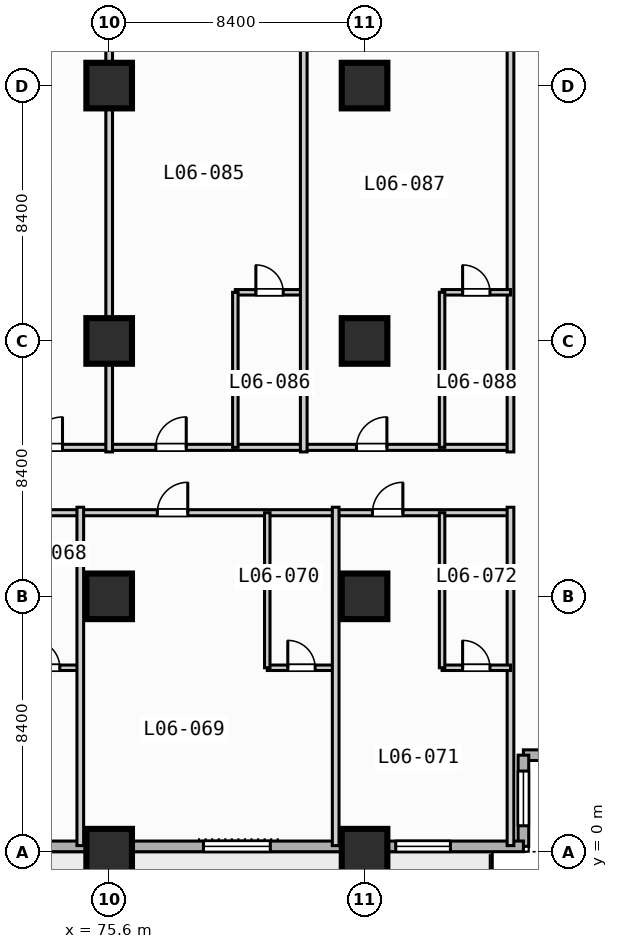
"""IFC4 building model, lengths in metres.
Left out: names, types, materials, properties, quantities, classifications, styles, units other than length and angle.
Written with IfcOpenShell. Run it as: python <this file> out.ifc"""

import sys

from ifc_helpers import new_model, si_unit, direction, frame, frame_2d, origin, origin_2d, place, context, subcontext, project, spatial, rectangle, extrude, element, fill, save


model = new_model("IFC4")
c1 = context("Model", 3, precision=1e-05, world=origin(), true_north=direction((0.0, 1.0)))
c2 = subcontext(c1, "Body", "Model", "MODEL_VIEW")
j1 = project(units=[si_unit("LENGTHUNIT", "METRE"), si_unit("PLANEANGLEUNIT", "RADIAN")], contexts=[c1])
p1 = place(None, origin())
s1 = spatial("IfcSite", under=j1, at=p1, CompositionType="ELEMENT")
p2 = place(p1, origin())
s2 = spatial("IfcBuilding", under=s1, at=p2, CompositionType="ELEMENT")
p3 = place(p2, frame((0.0, 0.0, 32.0)))
s3 = spatial("IfcBuildingStorey", under=s2, at=p3, CompositionType="ELEMENT", Elevation=32.0)
for number, where, z_axis, x_axis in (
    (1, (75.6, 0.0, 0.0), (0.0, 0.0, 1.0), (1.0, 0.0, 0.0)),
    (2, (75.6, 8.4, 0.0), (0.0, 0.0, 1.0), (1.0, 0.0, 0.0)),
    (3, (75.6, 16.8, 0.0), (0.0, 0.0, 1.0), (1.0, 0.0, 0.0)),
    (4, (75.6, 25.2, 0.0), (0.0, 0.0, 1.0), (1.0, 0.0, 0.0)),
    (5, (84.0, 0.0, 0.0), (0.0, 0.0, 1.0), (1.0, 0.0, 0.0)),
    (6, (84.0, 8.4, 0.0), (0.0, 0.0, 1.0), (1.0, 0.0, 0.0)),
    (7, (84.0, 16.8, 0.0), (0.0, 0.0, 1.0), (1.0, 0.0, 0.0)),
    (8, (84.0, 25.2, 0.0), (0.0, 0.0, 1.0), (1.0, 0.0, 0.0)),
):
    element("IfcColumn", number, at=place(p3, frame(where, z_axis=z_axis, x_axis=x_axis)), inside=s3, PredefinedType="COLUMN", context=c2, shape_type="SweptSolid", body=[
        extrude(rectangle(XDim=1.5, YDim=1.5, at=origin_2d()), origin(), (0.0, 0.0, 1.0), 3.8),
    ])
p4 = place(p3, frame((92.225, 3.175, 0.0), z_axis=(0.0, 0.0, 1.0), x_axis=(-1.0, 0.0, 0.0)))
e9 = element("IfcWall", 9, at=p4, inside=s3, PredefinedType="STANDARD", context=c2, shape_type="SweptSolid", body=[
    extrude(rectangle(XDim=3.0, YDim=0.35, at=frame_2d((1.5, 0.0))), origin(), (0.0, 0.0, 1.0), 3.55),
])
p5 = place(p3, frame((89.225, 3.175, 0.0), z_axis=(0.0, 0.0, 1.0), x_axis=(0.0, -1.0, 0.0)))
e10 = element("IfcWall", 10, at=p5, inside=s3, PredefinedType="STANDARD", context=c2, shape_type="SweptSolid", body=[
    extrude(rectangle(XDim=3.0, YDim=0.35, at=frame_2d((1.5, 0.0))), origin(), (0.0, 0.0, 1.0), 3.55),
])
p6 = place(p5, frame((0.522, 0.0, 0.85)))
e11 = element("IfcOpeningElement", 11, at=p6, cuts=e10, PredefinedType="OPENING", context=c2, shape_type="SweptSolid", body=[
    extrude(rectangle(XDim=1.8, YDim=1.8, at=frame_2d((0.9, 0.9))), frame((0.0, 0.185, 0.0), z_axis=(0.0, -1.0, 0.0), x_axis=(1.0, 0.0, 0.0)), (0.0, 0.0, 1.0), 0.37),
])
p7 = place(p3, frame((89.225, 0.175, 0.0), z_axis=(0.0, 0.0, 1.0), x_axis=(-1.0, 0.0, 0.0)))
e12 = element("IfcWall", 12, at=p7, inside=s3, PredefinedType="STANDARD", context=c2, shape_type="SweptSolid", body=[
    extrude(rectangle(XDim=86.05, YDim=0.35, at=frame_2d((43.025, 0.0))), origin(), (0.0, 0.0, 1.0), 3.55),
])
p8 = place(p7, frame((67.525, 0.0, 0.0)))
e13 = element("IfcOpeningElement", 13, at=p8, cuts=e12, PredefinedType="OPENING", context=c2, shape_type="SweptSolid", body=[
    extrude(rectangle(XDim=1.4, YDim=2.2, at=frame_2d((0.7, 1.1))), frame((0.0, 0.185, 0.0), z_axis=(0.0, -1.0, 0.0), x_axis=(1.0, 0.0, 0.0)), (0.0, 0.0, 1.0), 0.37),
])
p9 = place(p7, frame((58.725, 0.0, 0.85)))
e14 = element("IfcOpeningElement", 14, at=p9, cuts=e12, PredefinedType="OPENING", context=c2, shape_type="SweptSolid", body=[
    extrude(rectangle(XDim=2.2, YDim=1.8, at=frame_2d((1.1, 0.9))), frame((0.0, 0.185, 0.0), z_axis=(0.0, -1.0, 0.0), x_axis=(1.0, 0.0, 0.0)), (0.0, 0.0, 1.0), 0.37),
])
p10 = place(p7, frame((50.325, 0.0, 0.85)))
e15 = element("IfcOpeningElement", 15, at=p10, cuts=e12, PredefinedType="OPENING", context=c2, shape_type="SweptSolid", body=[
    extrude(rectangle(XDim=2.2, YDim=1.8, at=frame_2d((1.1, 0.9))), frame((0.0, 0.185, 0.0), z_axis=(0.0, -1.0, 0.0), x_axis=(1.0, 0.0, 0.0)), (0.0, 0.0, 1.0), 0.37),
])
p11 = place(p7, frame((41.925, 0.0, 0.85)))
e16 = element("IfcOpeningElement", 16, at=p11, cuts=e12, PredefinedType="OPENING", context=c2, shape_type="SweptSolid", body=[
    extrude(rectangle(XDim=2.2, YDim=1.8, at=frame_2d((1.1, 0.9))), frame((0.0, 0.185, 0.0), z_axis=(0.0, -1.0, 0.0), x_axis=(1.0, 0.0, 0.0)), (0.0, 0.0, 1.0), 0.37),
])
p12 = place(p7, frame((33.525, 0.0, 0.85)))
e17 = element("IfcOpeningElement", 17, at=p12, cuts=e12, PredefinedType="OPENING", context=c2, shape_type="SweptSolid", body=[
    extrude(rectangle(XDim=2.2, YDim=1.8, at=frame_2d((1.1, 0.9))), frame((0.0, 0.185, 0.0), z_axis=(0.0, -1.0, 0.0), x_axis=(1.0, 0.0, 0.0)), (0.0, 0.0, 1.0), 0.37),
])
p13 = place(p7, frame((16.725, 0.0, 0.85)))
e18 = element("IfcOpeningElement", 18, at=p13, cuts=e12, PredefinedType="OPENING", context=c2, shape_type="SweptSolid", body=[
    extrude(rectangle(XDim=2.2, YDim=1.8, at=frame_2d((1.1, 0.9))), frame((0.0, 0.185, 0.0), z_axis=(0.0, -1.0, 0.0), x_axis=(1.0, 0.0, 0.0)), (0.0, 0.0, 1.0), 0.37),
])
p14 = place(p7, frame((8.325, 0.0, 0.85)))
e19 = element("IfcOpeningElement", 19, at=p14, cuts=e12, PredefinedType="OPENING", context=c2, shape_type="SweptSolid", body=[
    extrude(rectangle(XDim=2.2, YDim=1.8, at=frame_2d((1.1, 0.9))), frame((0.0, 0.185, 0.0), z_axis=(0.0, -1.0, 0.0), x_axis=(1.0, 0.0, 0.0)), (0.0, 0.0, 1.0), 0.37),
])
p15 = place(p7, frame((2.4, 0.0, 0.85)))
e20 = element("IfcOpeningElement", 20, at=p15, cuts=e12, PredefinedType="OPENING", context=c2, shape_type="SweptSolid", body=[
    extrude(rectangle(XDim=1.8, YDim=1.8, at=frame_2d((0.9, 0.9))), frame((0.0, 0.185, 0.0), z_axis=(0.0, -1.0, 0.0), x_axis=(1.0, 0.0, 0.0)), (0.0, 0.0, 1.0), 0.37),
])
p16 = place(p3, frame((13.4, 11.15, 0.0), z_axis=(0.0, 0.0, 1.0), x_axis=(1.0, 0.0, 0.0)))
e21 = element("IfcWall", 21, at=p16, inside=s3, PredefinedType="PARTITIONING", context=c2, shape_type="SweptSolid", body=[
    extrude(rectangle(XDim=75.4, YDim=0.2, at=frame_2d((37.7, 0.0))), origin(), (0.0, 0.0, 1.0), 3.55),
])
p17 = place(p16, frame((6.065, 0.0, 0.0)))
e22 = element("IfcOpeningElement", 22, at=p17, cuts=e21, PredefinedType="OPENING", context=c2, shape_type="SweptSolid", body=[
    extrude(rectangle(XDim=1.0, YDim=2.15, at=frame_2d((0.5, 1.075))), frame((0.0, 0.11, 0.0), z_axis=(0.0, -1.0, 0.0), x_axis=(1.0, 0.0, 0.0)), (0.0, 0.0, 1.0), 0.22),
])
p18 = place(p16, frame((13.36, 0.0, 0.0)))
e23 = element("IfcOpeningElement", 23, at=p18, cuts=e21, PredefinedType="OPENING", context=c2, shape_type="SweptSolid", body=[
    extrude(rectangle(XDim=1.0, YDim=2.15, at=frame_2d((0.5, 1.075))), frame((0.0, 0.11, 0.0), z_axis=(0.0, -1.0, 0.0), x_axis=(1.0, 0.0, 0.0)), (0.0, 0.0, 1.0), 0.22),
])
p19 = place(p16, frame((21.785, 0.0, 0.0)))
e24 = element("IfcOpeningElement", 24, at=p19, cuts=e21, PredefinedType="OPENING", context=c2, shape_type="SweptSolid", body=[
    extrude(rectangle(XDim=1.0, YDim=2.15, at=frame_2d((0.5, 1.075))), frame((0.0, 0.11, 0.0), z_axis=(0.0, -1.0, 0.0), x_axis=(1.0, 0.0, 0.0)), (0.0, 0.0, 1.0), 0.22),
])
p20 = place(p16, frame((30.185, 0.0, 0.0)))
e25 = element("IfcOpeningElement", 25, at=p20, cuts=e21, PredefinedType="OPENING", context=c2, shape_type="SweptSolid", body=[
    extrude(rectangle(XDim=1.0, YDim=2.15, at=frame_2d((0.5, 1.075))), frame((0.0, 0.11, 0.0), z_axis=(0.0, -1.0, 0.0), x_axis=(1.0, 0.0, 0.0)), (0.0, 0.0, 1.0), 0.22),
])
p21 = place(p16, frame((41.76, 0.0, 0.0)))
e26 = element("IfcOpeningElement", 26, at=p21, cuts=e21, PredefinedType="OPENING", context=c2, shape_type="SweptSolid", body=[
    extrude(rectangle(XDim=1.0, YDim=2.15, at=frame_2d((0.5, 1.075))), frame((0.0, 0.11, 0.0), z_axis=(0.0, -1.0, 0.0), x_axis=(1.0, 0.0, 0.0)), (0.0, 0.0, 1.0), 0.22),
])
p22 = place(p16, frame((54.36, 0.0, 0.0)))
e27 = element("IfcOpeningElement", 27, at=p22, cuts=e21, PredefinedType="OPENING", context=c2, shape_type="SweptSolid", body=[
    extrude(rectangle(XDim=1.0, YDim=2.15, at=frame_2d((0.5, 1.075))), frame((0.0, 0.11, 0.0), z_axis=(0.0, -1.0, 0.0), x_axis=(1.0, 0.0, 0.0)), (0.0, 0.0, 1.0), 0.22),
])
p23 = place(p16, frame((63.785, 0.0, 0.0)))
e28 = element("IfcOpeningElement", 28, at=p23, cuts=e21, PredefinedType="OPENING", context=c2, shape_type="SweptSolid", body=[
    extrude(rectangle(XDim=1.0, YDim=2.15, at=frame_2d((0.5, 1.075))), frame((0.0, 0.11, 0.0), z_axis=(0.0, -1.0, 0.0), x_axis=(1.0, 0.0, 0.0)), (0.0, 0.0, 1.0), 0.22),
])
p24 = place(p16, frame((70.86, 0.0, 0.0)))
e29 = element("IfcOpeningElement", 29, at=p24, cuts=e21, PredefinedType="OPENING", context=c2, shape_type="SweptSolid", body=[
    extrude(rectangle(XDim=1.0, YDim=2.15, at=frame_2d((0.5, 1.075))), frame((0.0, 0.11, 0.0), z_axis=(0.0, -1.0, 0.0), x_axis=(1.0, 0.0, 0.0)), (0.0, 0.0, 1.0), 0.22),
])
p25 = place(p3, frame((72.4, 6.05, 0.0), z_axis=(0.0, 0.0, 1.0), x_axis=(1.0, 0.0, 0.0)))
e30 = element("IfcWall", 30, at=p25, inside=s3, PredefinedType="PLUMBINGWALL", context=c2, shape_type="SweptSolid", body=[
    extrude(rectangle(XDim=2.25, YDim=0.18, at=frame_2d((1.125, 0.0))), origin(), (0.0, 0.0, 1.0), 3.55),
])
p26 = place(p25, frame((0.675, 0.0, 0.0)))
e31 = element("IfcOpeningElement", 31, at=p26, cuts=e30, PredefinedType="OPENING", context=c2, shape_type="SweptSolid", body=[
    extrude(rectangle(XDim=0.9, YDim=2.1, at=frame_2d((0.45, 1.05))), frame((0.0, 0.1, 0.0), z_axis=(0.0, -1.0, 0.0), x_axis=(1.0, 0.0, 0.0)), (0.0, 0.0, 1.0), 0.2),
])
p27 = place(p3, frame((74.65, 0.2, 0.0), z_axis=(0.0, 0.0, 1.0), x_axis=(0.0, 1.0, 0.0)))
e32 = element("IfcWall", 32, at=p27, inside=s3, PredefinedType="PARTITIONING", context=c2, shape_type="SweptSolid", body=[
    extrude(rectangle(XDim=11.13, YDim=0.22, at=frame_2d((5.565, 0.0))), origin(), (0.0, 0.0, 1.0), 3.55),
])
p28 = place(p3, frame((80.8, 6.05, 0.0), z_axis=(0.0, 0.0, 1.0), x_axis=(1.0, 0.0, 0.0)))
e33 = element("IfcWall", 33, at=p28, inside=s3, PredefinedType="PLUMBINGWALL", context=c2, shape_type="SweptSolid", body=[
    extrude(rectangle(XDim=2.25, YDim=0.18, at=frame_2d((1.125, 0.0))), origin(), (0.0, 0.0, 1.0), 3.55),
])
p29 = place(p28, frame((0.675, 0.0, 0.0)))
e34 = element("IfcOpeningElement", 34, at=p29, cuts=e33, PredefinedType="OPENING", context=c2, shape_type="SweptSolid", body=[
    extrude(rectangle(XDim=0.9, YDim=2.1, at=frame_2d((0.45, 1.05))), frame((0.0, 0.1, 0.0), z_axis=(0.0, -1.0, 0.0), x_axis=(1.0, 0.0, 0.0)), (0.0, 0.0, 1.0), 0.2),
])
p30 = place(p3, frame((80.8, 6.05, 0.0), z_axis=(0.0, 0.0, 1.0), x_axis=(0.0, 1.0, 0.0)))
e35 = element("IfcWall", 35, at=p30, inside=s3, PredefinedType="PLUMBINGWALL", context=c2, shape_type="SweptSolid", body=[
    extrude(rectangle(XDim=5.1, YDim=0.18, at=frame_2d((2.55, 0.0))), origin(), (0.0, 0.0, 1.0), 3.55),
])
for number, where, z_axis, x_axis in (
    (36, (83.05, 0.2, 0.0), (0.0, 0.0, 1.0), (0.0, 1.0, 0.0)),
    (37, (88.8, 0.2, 0.0), (0.0, 0.0, 1.0), (0.0, 1.0, 0.0)),
):
    element("IfcWall", number, at=place(p3, frame(where, z_axis=z_axis, x_axis=x_axis)), inside=s3, PredefinedType="PARTITIONING", context=c2, shape_type="SweptSolid", body=[
        extrude(rectangle(XDim=11.13, YDim=0.22, at=frame_2d((5.565, 0.0))), origin(), (0.0, 0.0, 1.0), 3.55),
    ])
p31 = place(p3, frame((86.55, 6.05, 0.0), z_axis=(0.0, 0.0, 1.0), x_axis=(1.0, 0.0, 0.0)))
e38 = element("IfcWall", 38, at=p31, inside=s3, PredefinedType="PLUMBINGWALL", context=c2, shape_type="SweptSolid", body=[
    extrude(rectangle(XDim=2.25, YDim=0.18, at=frame_2d((1.125, 0.0))), origin(), (0.0, 0.0, 1.0), 3.55),
])
p32 = place(p31, frame((0.675, 0.0, 0.0)))
e39 = element("IfcOpeningElement", 39, at=p32, cuts=e38, PredefinedType="OPENING", context=c2, shape_type="SweptSolid", body=[
    extrude(rectangle(XDim=0.9, YDim=2.1, at=frame_2d((0.45, 1.05))), frame((0.0, 0.1, 0.0), z_axis=(0.0, -1.0, 0.0), x_axis=(1.0, 0.0, 0.0)), (0.0, 0.0, 1.0), 0.2),
])
p33 = place(p3, frame((86.55, 6.05, 0.0), z_axis=(0.0, 0.0, 1.0), x_axis=(0.0, 1.0, 0.0)))
e40 = element("IfcWall", 40, at=p33, inside=s3, PredefinedType="PLUMBINGWALL", context=c2, shape_type="SweptSolid", body=[
    extrude(rectangle(XDim=5.1, YDim=0.18, at=frame_2d((2.55, 0.0))), origin(), (0.0, 0.0, 1.0), 3.55),
])
p34 = place(p3, frame((61.6, 13.3, 0.0), z_axis=(0.0, 0.0, 1.0), x_axis=(1.0, 0.0, 0.0)))
e41 = element("IfcWall", 41, at=p34, inside=s3, PredefinedType="PARTITIONING", context=c2, shape_type="SweptSolid", body=[
    extrude(rectangle(XDim=27.2, YDim=0.2, at=frame_2d((13.6, 0.0))), origin(), (0.0, 0.0, 1.0), 3.55),
])
p35 = place(p34, frame((4.465, 0.0, 0.0)))
e42 = element("IfcOpeningElement", 42, at=p35, cuts=e41, PredefinedType="OPENING", context=c2, shape_type="SweptSolid", body=[
    extrude(rectangle(XDim=1.0, YDim=2.15, at=frame_2d((0.5, 1.075))), frame((0.0, 0.11, 0.0), z_axis=(0.0, -1.0, 0.0), x_axis=(1.0, 0.0, 0.0)), (0.0, 0.0, 1.0), 0.22),
])
p36 = place(p34, frame((11.465, 0.0, 0.0)))
e43 = element("IfcOpeningElement", 43, at=p36, cuts=e41, PredefinedType="OPENING", context=c2, shape_type="SweptSolid", body=[
    extrude(rectangle(XDim=1.0, YDim=2.15, at=frame_2d((0.5, 1.075))), frame((0.0, 0.11, 0.0), z_axis=(0.0, -1.0, 0.0), x_axis=(1.0, 0.0, 0.0)), (0.0, 0.0, 1.0), 0.22),
])
p37 = place(p34, frame((15.535, 0.0, 0.0)))
e44 = element("IfcOpeningElement", 44, at=p37, cuts=e41, PredefinedType="OPENING", context=c2, shape_type="SweptSolid", body=[
    extrude(rectangle(XDim=1.0, YDim=2.15, at=frame_2d((0.5, 1.075))), frame((0.0, 0.11, 0.0), z_axis=(0.0, -1.0, 0.0), x_axis=(1.0, 0.0, 0.0)), (0.0, 0.0, 1.0), 0.22),
])
p38 = place(p34, frame((22.135, 0.0, 0.0)))
e45 = element("IfcOpeningElement", 45, at=p38, cuts=e41, PredefinedType="OPENING", context=c2, shape_type="SweptSolid", body=[
    extrude(rectangle(XDim=1.0, YDim=2.15, at=frame_2d((0.5, 1.075))), frame((0.0, 0.11, 0.0), z_axis=(0.0, -1.0, 0.0), x_axis=(1.0, 0.0, 0.0)), (0.0, 0.0, 1.0), 0.22),
])
p39 = place(p3, frame((75.6, 13.15, 0.0), z_axis=(0.0, 0.0, 1.0), x_axis=(0.0, 1.0, 0.0)))
e46 = element("IfcWall", 46, at=p39, inside=s3, PredefinedType="PARTITIONING", context=c2, shape_type="SweptSolid", body=[
    extrude(rectangle(XDim=20.28, YDim=0.22, at=frame_2d((10.14, 0.0))), origin(), (0.0, 0.0, 1.0), 2.8),
])
p40 = place(p3, frame((79.75, 18.4, 0.0), z_axis=(0.0, 0.0, 1.0), x_axis=(1.0, 0.0, 0.0)))
e47 = element("IfcWall", 47, at=p40, inside=s3, PredefinedType="PLUMBINGWALL", context=c2, shape_type="SweptSolid", body=[
    extrude(rectangle(XDim=2.25, YDim=0.18, at=frame_2d((1.125, 0.0))), origin(), (0.0, 0.0, 1.0), 3.55),
])
p41 = place(p40, frame((0.675, 0.0, 0.0)))
e48 = element("IfcOpeningElement", 48, at=p41, cuts=e47, PredefinedType="OPENING", context=c2, shape_type="SweptSolid", body=[
    extrude(rectangle(XDim=0.9, YDim=2.1, at=frame_2d((0.45, 1.05))), frame((0.0, 0.1, 0.0), z_axis=(0.0, -1.0, 0.0), x_axis=(1.0, 0.0, 0.0)), (0.0, 0.0, 1.0), 0.2),
])
p42 = place(p3, frame((79.75, 13.3, 0.0), z_axis=(0.0, 0.0, 1.0), x_axis=(0.0, 1.0, 0.0)))
e49 = element("IfcWall", 49, at=p42, inside=s3, PredefinedType="PLUMBINGWALL", context=c2, shape_type="SweptSolid", body=[
    extrude(rectangle(XDim=5.1, YDim=0.18, at=frame_2d((2.55, 0.0))), origin(), (0.0, 0.0, 1.0), 3.55),
])
for number, where, z_axis, x_axis in (
    (50, (82.0, 13.15, 0.0), (0.0, 0.0, 1.0), (0.0, 1.0, 0.0)),
    (51, (88.8, 13.15, 0.0), (0.0, 0.0, 1.0), (0.0, 1.0, 0.0)),
):
    element("IfcWall", number, at=place(p3, frame(where, z_axis=z_axis, x_axis=x_axis)), inside=s3, PredefinedType="PARTITIONING", context=c2, shape_type="SweptSolid", body=[
        extrude(rectangle(XDim=20.28, YDim=0.22, at=frame_2d((10.14, 0.0))), origin(), (0.0, 0.0, 1.0), 3.55),
    ])
p43 = place(p3, frame((86.55, 18.4, 0.0), z_axis=(0.0, 0.0, 1.0), x_axis=(1.0, 0.0, 0.0)))
e52 = element("IfcWall", 52, at=p43, inside=s3, PredefinedType="PLUMBINGWALL", context=c2, shape_type="SweptSolid", body=[
    extrude(rectangle(XDim=2.25, YDim=0.18, at=frame_2d((1.125, 0.0))), origin(), (0.0, 0.0, 1.0), 3.55),
])
p44 = place(p43, frame((0.675, 0.0, 0.0)))
e53 = element("IfcOpeningElement", 53, at=p44, cuts=e52, PredefinedType="OPENING", context=c2, shape_type="SweptSolid", body=[
    extrude(rectangle(XDim=0.9, YDim=2.1, at=frame_2d((0.45, 1.05))), frame((0.0, 0.1, 0.0), z_axis=(0.0, -1.0, 0.0), x_axis=(1.0, 0.0, 0.0)), (0.0, 0.0, 1.0), 0.2),
])
p45 = place(p3, frame((86.55, 13.3, 0.0), z_axis=(0.0, 0.0, 1.0), x_axis=(0.0, 1.0, 0.0)))
e54 = element("IfcWall", 54, at=p45, inside=s3, PredefinedType="PLUMBINGWALL", context=c2, shape_type="SweptSolid", body=[
    extrude(rectangle(XDim=5.1, YDim=0.18, at=frame_2d((2.55, 0.0))), origin(), (0.0, 0.0, 1.0), 3.55),
])
p46 = place(p6, origin())
e55 = element("IfcWindow", 55, at=p46, inside=s3, PartitioningType="SINGLE_PANEL", PredefinedType="WINDOW", context=c2, shape_type="SweptSolid", body=[
    extrude(rectangle(XDim=1.8, YDim=1.8, at=frame_2d((0.9, 0.9))), frame((0.0, 0.03, 0.0), z_axis=(0.0, -1.0, 0.0), x_axis=(1.0, 0.0, 0.0)), (0.0, 0.0, 1.0), 0.06),
])
fill(e11, e55)
p47 = place(p14, origin())
e56 = element("IfcWindow", 56, at=p47, inside=s3, PartitioningType="SINGLE_PANEL", PredefinedType="WINDOW", context=c2, shape_type="SweptSolid", body=[
    extrude(rectangle(XDim=2.2, YDim=1.8, at=frame_2d((1.1, 0.9))), frame((0.0, 0.03, 0.0), z_axis=(0.0, -1.0, 0.0), x_axis=(1.0, 0.0, 0.0)), (0.0, 0.0, 1.0), 0.06),
])
fill(e19, e56)
p48 = place(p15, origin())
e57 = element("IfcWindow", 57, at=p48, inside=s3, PartitioningType="SINGLE_PANEL", PredefinedType="WINDOW", context=c2, shape_type="SweptSolid", body=[
    extrude(rectangle(XDim=1.8, YDim=1.8, at=frame_2d((0.9, 0.9))), frame((0.0, 0.03, 0.0), z_axis=(0.0, -1.0, 0.0), x_axis=(1.0, 0.0, 0.0)), (0.0, 0.0, 1.0), 0.06),
])
fill(e20, e57)
p49 = place(p23, origin())
e58 = element("IfcDoor", 58, at=p49, inside=s3, OperationType="SINGLE_SWING_RIGHT", PredefinedType="DOOR", context=c2, shape_type="SweptSolid", body=[
    extrude(rectangle(XDim=1.0, YDim=2.15, at=frame_2d((0.5, 1.075))), frame((0.0, 0.025, 0.0), z_axis=(0.0, -1.0, 0.0), x_axis=(1.0, 0.0, 0.0)), (0.0, 0.0, 1.0), 0.05),
])
fill(e28, e58)
p50 = place(p24, origin())
e59 = element("IfcDoor", 59, at=p50, inside=s3, OperationType="SINGLE_SWING_RIGHT", PredefinedType="DOOR", context=c2, shape_type="SweptSolid", body=[
    extrude(rectangle(XDim=1.0, YDim=2.15, at=frame_2d((0.5, 1.075))), frame((0.0, 0.025, 0.0), z_axis=(0.0, -1.0, 0.0), x_axis=(1.0, 0.0, 0.0)), (0.0, 0.0, 1.0), 0.05),
])
fill(e29, e59)
p51 = place(p26, origin())
e60 = element("IfcDoor", 60, at=p51, inside=s3, OperationType="SINGLE_SWING_LEFT", PredefinedType="DOOR", context=c2, shape_type="SweptSolid", body=[
    extrude(rectangle(XDim=0.9, YDim=2.1, at=frame_2d((0.45, 1.05))), frame((0.0, 0.025, 0.0), z_axis=(0.0, -1.0, 0.0), x_axis=(1.0, 0.0, 0.0)), (0.0, 0.0, 1.0), 0.05),
])
fill(e31, e60)
p52 = place(p29, origin())
e61 = element("IfcDoor", 61, at=p52, inside=s3, OperationType="SINGLE_SWING_LEFT", PredefinedType="DOOR", context=c2, shape_type="SweptSolid", body=[
    extrude(rectangle(XDim=0.9, YDim=2.1, at=frame_2d((0.45, 1.05))), frame((0.0, 0.025, 0.0), z_axis=(0.0, -1.0, 0.0), x_axis=(1.0, 0.0, 0.0)), (0.0, 0.0, 1.0), 0.05),
])
fill(e34, e61)
p53 = place(p32, origin())
e62 = element("IfcDoor", 62, at=p53, inside=s3, OperationType="SINGLE_SWING_LEFT", PredefinedType="DOOR", context=c2, shape_type="SweptSolid", body=[
    extrude(rectangle(XDim=0.9, YDim=2.1, at=frame_2d((0.45, 1.05))), frame((0.0, 0.025, 0.0), z_axis=(0.0, -1.0, 0.0), x_axis=(1.0, 0.0, 0.0)), (0.0, 0.0, 1.0), 0.05),
])
fill(e39, e62)
p54 = place(p36, origin())
e63 = element("IfcDoor", 63, at=p54, inside=s3, OperationType="SINGLE_SWING_RIGHT", PredefinedType="DOOR", context=c2, shape_type="SweptSolid", body=[
    extrude(rectangle(XDim=1.0, YDim=2.15, at=frame_2d((0.5, 1.075))), frame((0.0, 0.025, 0.0), z_axis=(0.0, -1.0, 0.0), x_axis=(1.0, 0.0, 0.0)), (0.0, 0.0, 1.0), 0.05),
])
fill(e43, e63)
p55 = place(p37, origin())
e64 = element("IfcDoor", 64, at=p55, inside=s3, OperationType="SINGLE_SWING_RIGHT", PredefinedType="DOOR", context=c2, shape_type="SweptSolid", body=[
    extrude(rectangle(XDim=1.0, YDim=2.15, at=frame_2d((0.5, 1.075))), frame((0.0, 0.025, 0.0), z_axis=(0.0, -1.0, 0.0), x_axis=(1.0, 0.0, 0.0)), (0.0, 0.0, 1.0), 0.05),
])
fill(e44, e64)
p56 = place(p38, origin())
e65 = element("IfcDoor", 65, at=p56, inside=s3, OperationType="SINGLE_SWING_RIGHT", PredefinedType="DOOR", context=c2, shape_type="SweptSolid", body=[
    extrude(rectangle(XDim=1.0, YDim=2.15, at=frame_2d((0.5, 1.075))), frame((0.0, 0.025, 0.0), z_axis=(0.0, -1.0, 0.0), x_axis=(1.0, 0.0, 0.0)), (0.0, 0.0, 1.0), 0.05),
])
fill(e45, e65)
p57 = place(p41, origin())
e66 = element("IfcDoor", 66, at=p57, inside=s3, OperationType="SINGLE_SWING_LEFT", PredefinedType="DOOR", context=c2, shape_type="SweptSolid", body=[
    extrude(rectangle(XDim=0.9, YDim=2.1, at=frame_2d((0.45, 1.05))), frame((0.0, 0.025, 0.0), z_axis=(0.0, -1.0, 0.0), x_axis=(1.0, 0.0, 0.0)), (0.0, 0.0, 1.0), 0.05),
])
fill(e48, e66)
p58 = place(p44, origin())
e67 = element("IfcDoor", 67, at=p58, inside=s3, OperationType="SINGLE_SWING_LEFT", PredefinedType="DOOR", context=c2, shape_type="SweptSolid", body=[
    extrude(rectangle(XDim=0.9, YDim=2.1, at=frame_2d((0.45, 1.05))), frame((0.0, 0.025, 0.0), z_axis=(0.0, -1.0, 0.0), x_axis=(1.0, 0.0, 0.0)), (0.0, 0.0, 1.0), 0.05),
])
fill(e53, e67)
save(model, sys.argv[1])
